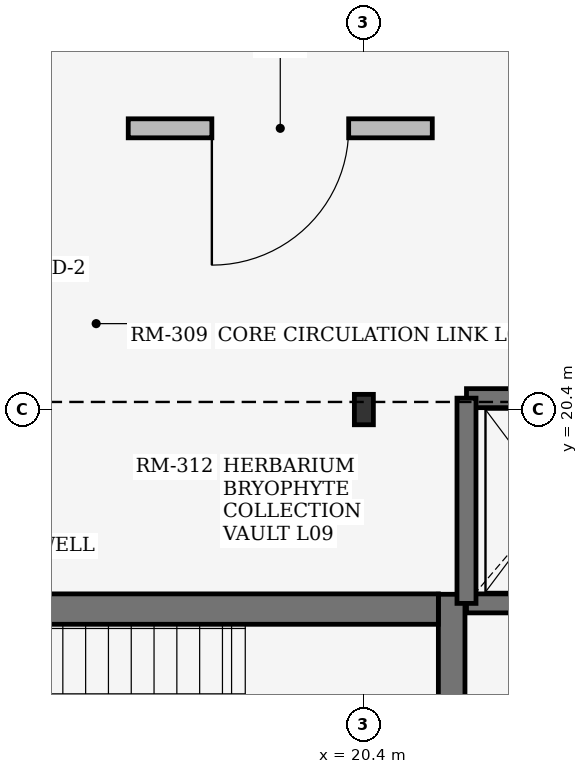
"""IFC4 building model, lengths in metres.
Left out: names, types, materials, properties, quantities, classifications, styles, units other than length and angle.
Written with IfcOpenShell. Run it as: python <this file> out.ifc"""

import sys

from ifc_helpers import new_model, si_unit, direction, frame, frame_2d, origin, origin_2d, place, context, subcontext, project, spatial, rectangle, i_section, extrude, element, fill, save


model = new_model("IFC4")
c1 = context("Model", 3, precision=1e-05, world=origin(), true_north=direction((0.0, 1.0)))
c2 = subcontext(c1, "Body", "Model", "MODEL_VIEW")
j1 = project(units=[si_unit("LENGTHUNIT", "METRE"), si_unit("PLANEANGLEUNIT", "RADIAN")], contexts=[c1])
p1 = place(None, origin())
s1 = spatial("IfcSite", under=j1, at=p1, CompositionType="ELEMENT")
p2 = place(p1, origin())
s2 = spatial("IfcBuilding", under=s1, at=p2, CompositionType="ELEMENT")
p3 = place(p2, frame((0.0, 0.0, 36.6)))
s3 = spatial("IfcBuildingStorey", under=s2, at=p3, CompositionType="ELEMENT", Elevation=36.6)
p4 = place(p3, frame((20.4, 20.4, 0.0), z_axis=(0.0, 0.0, 1.0), x_axis=(1.0, 0.0, 0.0)))
e1 = element("IfcColumn", 1, at=p4, inside=s3, PredefinedType="COLUMN", context=c2, shape_type="SweptSolid", body=[
    extrude(i_section(OverallWidth=0.25, OverallDepth=0.4, WebThickness=0.01, FlangeThickness=0.013, at=origin_2d()), origin(), (0.0, 0.0, 1.0), 3.62),
])
p5 = place(p3, frame((21.555, 13.38, 0.0), z_axis=(0.0, 0.0, 1.0), x_axis=(0.0, 1.0, 0.0)))
e2 = element("IfcWall", 2, at=p5, inside=s3, PredefinedType="SHEAR", context=c2, shape_type="SweptSolid", body=[
    extrude(rectangle(XDim=4.59, YDim=0.35, at=frame_2d((2.295, 0.0))), origin(), (0.0, 0.0, 1.0), 3.62),
])
p6 = place(p3, frame((13.4, 17.775, 0.0), z_axis=(0.0, 0.0, 1.0), x_axis=(1.0, 0.0, 0.0)))
e3 = element("IfcWall", 3, at=p6, inside=s3, PredefinedType="SHEAR", context=c2, shape_type="SweptSolid", body=[
    extrude(rectangle(XDim=7.98, YDim=0.4, at=frame_2d((3.99, 0.0))), origin(), (0.0, 0.0, 1.0), 3.62),
])
p7 = place(p3, frame((21.75, 17.85, 0.0), z_axis=(0.0, 0.0, 1.0), x_axis=(1.0, 0.0, 0.0)))
e4 = element("IfcWall", 4, at=p7, inside=s3, PredefinedType="SHEAR", context=c2, shape_type="SweptSolid", body=[
    extrude(rectangle(XDim=2.3, YDim=0.25, at=frame_2d((1.15, 0.0))), origin(), (0.0, 0.0, 1.0), 3.62),
])
p8 = place(p7, frame((0.6, 0.0, 0.0)))
e5 = element("IfcOpeningElement", 5, at=p8, cuts=e4, PredefinedType="OPENING", context=c2, shape_type="SweptSolid", body=[
    extrude(rectangle(XDim=1.1, YDim=2.2, at=frame_2d((0.55, 1.1))), frame((0.0, 0.135, 0.0), z_axis=(0.0, -1.0, 0.0), x_axis=(1.0, 0.0, 0.0)), (0.0, 0.0, 1.0), 0.27),
])
p9 = place(p3, frame((21.75, 20.55, 0.0), z_axis=(0.0, 0.0, 1.0), x_axis=(1.0, 0.0, 0.0)))
e6 = element("IfcWall", 6, at=p9, inside=s3, PredefinedType="SHEAR", context=c2, shape_type="SweptSolid", body=[
    extrude(rectangle(XDim=2.3, YDim=0.25, at=frame_2d((1.15, 0.0))), origin(), (0.0, 0.0, 1.0), 3.62),
])
p10 = place(p3, frame((21.75, 17.85, 0.0), z_axis=(0.0, 0.0, 1.0), x_axis=(0.0, 1.0, 0.0)))
e7 = element("IfcWall", 7, at=p10, inside=s3, PredefinedType="SHEAR", context=c2, shape_type="SweptSolid", body=[
    extrude(rectangle(XDim=2.7, YDim=0.25, at=frame_2d((1.35, 0.0))), origin(), (0.0, 0.0, 1.0), 3.62),
])
p11 = place(p3, frame((17.3, 24.1, 0.0), z_axis=(0.0, 0.0, 1.0), x_axis=(1.0, 0.0, 0.0)))
e8 = element("IfcWall", 8, at=p11, inside=s3, PredefinedType="SOLIDWALL", context=c2, shape_type="SweptSolid", body=[
    extrude(rectangle(XDim=4.0, YDim=0.25, at=frame_2d((2.0, 0.0))), origin(), (0.0, 0.0, 1.0), 3.6),
])
p12 = place(p11, frame((1.1, 0.0, 0.0)))
e9 = element("IfcOpeningElement", 9, at=p12, cuts=e8, PredefinedType="OPENING", context=c2, shape_type="SweptSolid", body=[
    extrude(rectangle(XDim=1.8, YDim=2.25, at=frame_2d((0.9, 1.125))), frame((0.0, 0.135, 0.0), z_axis=(0.0, -1.0, 0.0), x_axis=(1.0, 0.0, 0.0)), (0.0, 0.0, 1.0), 0.27),
])
p13 = place(p12, frame((1.8, 0.0, 0.0), z_axis=(0.0, 0.0, 1.0), x_axis=(-1.0, 0.0, 0.0)))
e10 = element("IfcDoor", 10, at=p13, inside=s3, OperationType="DOUBLE_DOOR_SINGLE_SWING", PredefinedType="DOOR", context=c2, shape_type="SweptSolid", body=[
    extrude(rectangle(XDim=1.8, YDim=2.25, at=frame_2d((0.9, 1.125))), frame((0.0, 0.025, 0.0), z_axis=(0.0, -1.0, 0.0), x_axis=(1.0, 0.0, 0.0)), (0.0, 0.0, 1.0), 0.05),
])
fill(e9, e10)
save(model, sys.argv[1])
